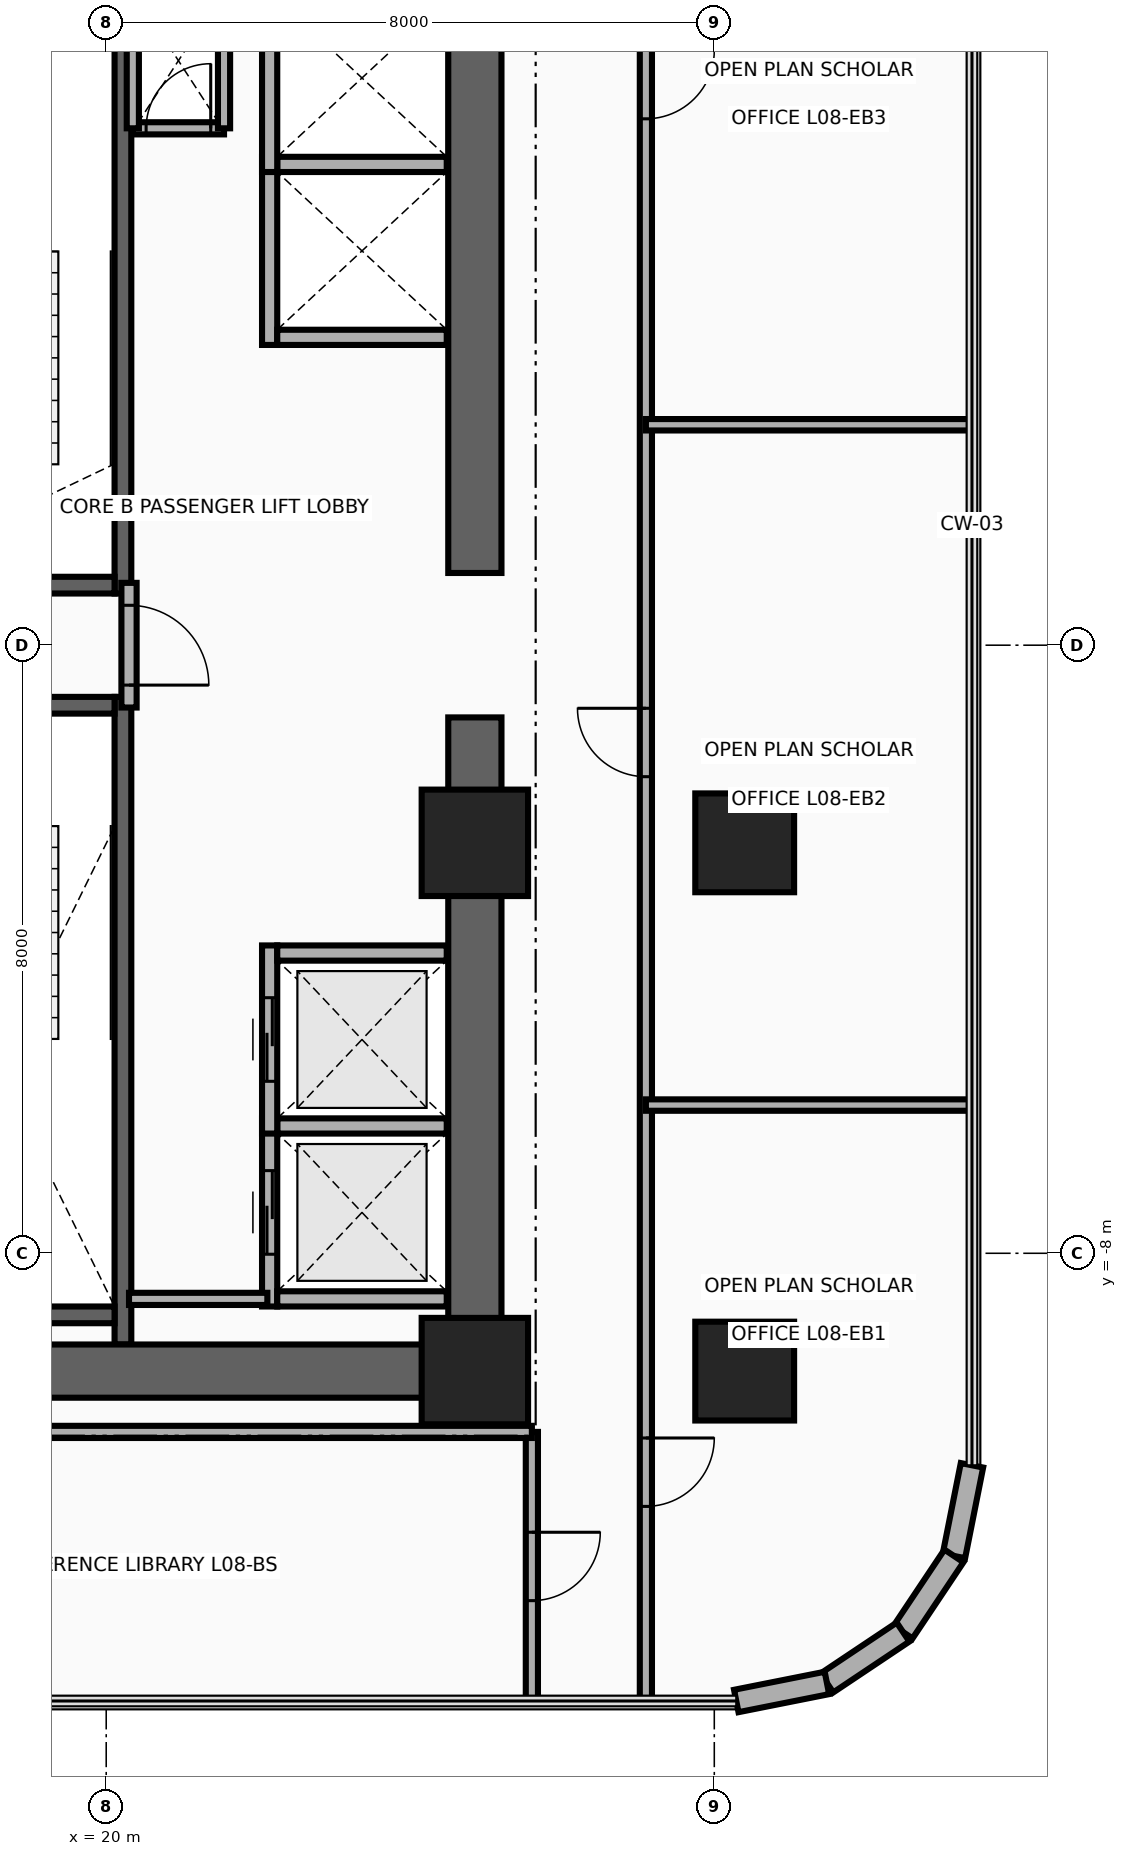
"""IFC4 building model, lengths in metres.
Left out: names, types, materials, properties, quantities, classifications, styles, units other than length and angle.
Written with IfcOpenShell. Run it as: python <this file> out.ifc"""

import sys

from ifc_helpers import new_model, si_unit, direction, frame, frame_2d, origin, origin_2d, place, context, subcontext, project, spatial, rectangle, circle, extrude, source, transform, mapped, element, fill, save


model = new_model("IFC4")
c1 = context("Model", 3, precision=1e-05, world=origin(), true_north=direction((0.0, 1.0)))
c2 = subcontext(c1, "Body", "Model", "MODEL_VIEW")
j1 = project(units=[si_unit("LENGTHUNIT", "METRE"), si_unit("PLANEANGLEUNIT", "RADIAN")], contexts=[c1])
p1 = place(None, origin())
s1 = spatial("IfcSite", under=j1, at=p1, CompositionType="ELEMENT")
p2 = place(p1, origin())
s2 = spatial("IfcBuilding", under=s1, at=p2, CompositionType="ELEMENT")
p3 = place(p2, frame((0.0, 0.0, 37.1)))
s3 = spatial("IfcBuildingStorey", under=s2, at=p3, CompositionType="ELEMENT", Elevation=37.1)
p4 = place(p3, frame((20.22, 0.68, 0.0), z_axis=(0.0, 0.0, 1.0), x_axis=(0.0, 1.0, 0.0)))
e1 = element("IfcWall", 1, at=p4, inside=s3, PredefinedType="SHEAR", context=c2, shape_type="SweptSolid", body=[
    extrude(rectangle(XDim=8.52, YDim=0.22, at=frame_2d((4.26, 0.0))), origin(), (0.0, 0.0, 1.0), 3.46),
])
p5 = place(p3, frame((17.0, 0.79, 0.0), z_axis=(0.0, 0.0, 1.0), x_axis=(1.0, 0.0, 0.0)))
e2 = element("IfcWall", 2, at=p5, inside=s3, PredefinedType="SHEAR", context=c2, shape_type="SweptSolid", body=[
    extrude(rectangle(XDim=3.11, YDim=0.22, at=frame_2d((1.555, 0.0))), origin(), (0.0, 0.0, 1.0), 3.46),
])
p6 = place(p5, frame((0.95, 0.0, 0.0)))
e3 = element("IfcOpeningElement", 3, at=p6, cuts=e2, PredefinedType="OPENING", context=c2, shape_type="SweptSolid", body=[
    extrude(rectangle(XDim=1.1, YDim=2.15, at=frame_2d((0.55, 1.075))), frame((0.0, 0.125, 0.0), z_axis=(0.0, -1.0, 0.0), x_axis=(1.0, 0.0, 0.0)), (0.0, 0.0, 1.0), 0.25),
])
p7 = place(p3, frame((20.22, -9.2, 0.0), z_axis=(0.0, 0.0, 1.0), x_axis=(0.0, 1.0, 0.0)))
e4 = element("IfcWall", 4, at=p7, inside=s3, PredefinedType="SHEAR", context=c2, shape_type="SweptSolid", body=[
    extrude(rectangle(XDim=8.52, YDim=0.22, at=frame_2d((4.26, 0.0))), origin(), (0.0, 0.0, 1.0), 3.46),
])
p8 = place(p3, frame((17.0, -8.81, 0.0), z_axis=(0.0, 0.0, 1.0), x_axis=(1.0, 0.0, 0.0)))
e5 = element("IfcWall", 5, at=p8, inside=s3, PredefinedType="SHEAR", context=c2, shape_type="SweptSolid", body=[
    extrude(rectangle(XDim=3.11, YDim=0.22, at=frame_2d((1.555, 0.0))), origin(), (0.0, 0.0, 1.0), 3.46),
])
p9 = place(p3, frame((17.0, -0.79, 0.0), z_axis=(0.0, 0.0, 1.0), x_axis=(1.0, 0.0, 0.0)))
e6 = element("IfcWall", 6, at=p9, inside=s3, PredefinedType="SHEAR", context=c2, shape_type="SweptSolid", body=[
    extrude(rectangle(XDim=3.11, YDim=0.22, at=frame_2d((1.555, 0.0))), origin(), (0.0, 0.0, 1.0), 3.46),
])
p10 = place(p9, frame((0.95, 0.0, 0.0)))
e7 = element("IfcOpeningElement", 7, at=p10, cuts=e6, PredefinedType="OPENING", context=c2, shape_type="SweptSolid", body=[
    extrude(rectangle(XDim=1.1, YDim=2.15, at=frame_2d((0.55, 1.075))), frame((0.0, 0.125, 0.0), z_axis=(0.0, -1.0, 0.0), x_axis=(1.0, 0.0, 0.0)), (0.0, 0.0, 1.0), 0.25),
])
for number, where, z_axis, x_axis in (
    (8, (24.85, -9.9, 0.0), (0.0, 0.0, 1.0), (0.0, 1.0, 0.0)),
    (9, (24.85, 0.95, 0.0), (0.0, 0.0, 1.0), (0.0, 1.0, 0.0)),
):
    element("IfcWall", number, at=place(p3, frame(where, z_axis=z_axis, x_axis=x_axis)), inside=s3, PredefinedType="SHEAR", context=c2, shape_type="SweptSolid", body=[
        extrude(rectangle(XDim=8.95, YDim=0.7, at=frame_2d((4.475, 0.0))), origin(), (0.0, 0.0, 1.0), 3.46),
    ])
p11 = place(p3, frame((15.85, -9.55, 0.0), z_axis=(0.0, 0.0, 1.0), x_axis=(1.0, 0.0, 0.0)))
e10 = element("IfcWall", 10, at=p11, inside=s3, PredefinedType="SHEAR", context=c2, shape_type="SweptSolid", body=[
    extrude(rectangle(XDim=9.0, YDim=0.7, at=frame_2d((4.5, 0.0))), origin(), (0.0, 0.0, 1.0), 3.46),
])
m1 = source(origin(), c2, "Body", "SweptSolid", [
    extrude(rectangle(XDim=1.4, YDim=1.4, at=origin_2d()), origin(), (0.0, 0.0, 1.0), 3.7),
])
p12 = place(p3, frame((24.85, -9.55, 0.0), z_axis=(0.0, 0.0, 1.0), x_axis=(1.0, 0.0, 0.0)))
e11 = element("IfcColumn", 11, at=p12, inside=s3, PredefinedType="COLUMN", context=c2, shape_type="MappedRepresentation", body=[
    mapped(m1, transform((0.0, 0.0, 0.0), x_axis=(1.0, 0.0, 0.0), y_axis=(0.0, 1.0, 0.0), z_axis=(0.0, 0.0, 1.0), scale=1.0)),
])
m2 = source(origin(), c2, "Body", "SweptSolid", [
    extrude(circle(Radius=0.65, at=origin_2d()), origin(), (0.0, 0.0, 1.0), 3.7),
])
p13 = place(p3, frame((28.4, -9.55, 0.0), z_axis=(0.0, 0.0, 1.0), x_axis=(1.0, 0.0, 0.0)))
e12 = element("IfcColumn", 12, at=p13, inside=s3, PredefinedType="COLUMN", context=c2, shape_type="MappedRepresentation", body=[
    mapped(m2, transform((0.0, 0.0, 0.0), x_axis=(1.0, 0.0, 0.0), y_axis=(0.0, 1.0, 0.0), z_axis=(0.0, 0.0, 1.0), scale=1.0)),
])
p14 = place(p3, frame((24.85, -2.6, 0.0), z_axis=(0.0, 0.0, 1.0), x_axis=(1.0, 0.0, 0.0)))
e13 = element("IfcColumn", 13, at=p14, inside=s3, PredefinedType="COLUMN", context=c2, shape_type="MappedRepresentation", body=[
    mapped(m1, transform((0.0, 0.0, 0.0), x_axis=(1.0, 0.0, 0.0), y_axis=(0.0, 1.0, 0.0), z_axis=(0.0, 0.0, 1.0), scale=1.0)),
])
p15 = place(p3, frame((28.4, -2.6, 0.0), z_axis=(0.0, 0.0, 1.0), x_axis=(1.0, 0.0, 0.0)))
e14 = element("IfcColumn", 14, at=p15, inside=s3, PredefinedType="COLUMN", context=c2, shape_type="MappedRepresentation", body=[
    mapped(m2, transform((0.0, 0.0, 0.0), x_axis=(1.0, 0.0, 0.0), y_axis=(0.0, 1.0, 0.0), z_axis=(0.0, 0.0, 1.0), scale=1.0)),
])
p16 = place(p3, frame((31.39, -10.789, 0.0), z_axis=(0.0, 0.0, 1.0), x_axis=(-0.194996050505, -0.980804027463, 0.0)))
e15 = element("IfcWall", 15, at=p16, inside=s3, PredefinedType="SOLIDWALL", context=c2, shape_type="SweptSolid", body=[
    extrude(rectangle(XDim=1.216, YDim=0.3, at=frame_2d((0.608, 0.0))), origin(), (0.0, 0.0, 1.0), 3.46),
])
for number, where, z_axis, x_axis in (
    (16, (31.153, -11.982, 0.0), (0.0, 0.0, 1.0), (-0.556, -0.831, 0.0)),
    (17, (30.483, -12.983, 0.0), (0.0, 0.0, 1.0), (-0.831, -0.556, 0.0)),
):
    element("IfcWall", number, at=place(p3, frame(where, z_axis=z_axis, x_axis=x_axis)), inside=s3, PredefinedType="SOLIDWALL", context=c2, shape_type="SweptSolid", body=[
        extrude(rectangle(XDim=1.205, YDim=0.3, at=frame_2d((0.603, 0.0))), origin(), (0.0, 0.0, 1.0), 3.46),
    ])
p17 = place(p3, frame((29.482, -13.653, 0.0), z_axis=(0.0, 0.0, 1.0), x_axis=(-0.980804027463, -0.194996050505, 0.0)))
e18 = element("IfcWall", 18, at=p17, inside=s3, PredefinedType="SOLIDWALL", context=c2, shape_type="SweptSolid", body=[
    extrude(rectangle(XDim=1.216, YDim=0.3, at=frame_2d((0.608, 0.0))), origin(), (0.0, 0.0, 1.0), 3.46),
])
p18 = place(p3, frame((22.15, -8.7, 0.0), z_axis=(0.0, 0.0, 1.0), x_axis=(0.0, 1.0, 0.0)))
e19 = element("IfcWall", 19, at=p18, inside=s3, PredefinedType="MOVABLE", context=c2, shape_type="SweptSolid", body=[
    extrude(rectangle(XDim=2.475, YDim=0.2, at=frame_2d((1.237, 0.0))), origin(), (0.0, 0.0, 1.0), 3.46),
])
p19 = place(p18, frame((0.688, 0.0, 0.0)))
e20 = element("IfcOpeningElement", 20, at=p19, cuts=e19, PredefinedType="OPENING", context=c2, shape_type="SweptSolid", body=[
    extrude(rectangle(XDim=1.1, YDim=2.1, at=frame_2d((0.55, 1.05))), frame((0.0, 0.115, 0.0), z_axis=(0.0, -1.0, 0.0), x_axis=(1.0, 0.0, 0.0)), (0.0, 0.0, 1.0), 0.23),
])
for number, where, z_axis, x_axis in (
    (21, (22.25, -8.6, 0.0), (0.0, 0.0, 1.0), (1.0, 0.0, 0.0)),
    (22, (22.25, -6.325, 0.0), (0.0, 0.0, 1.0), (1.0, 0.0, 0.0)),
):
    element("IfcWall", number, at=place(p3, frame(where, z_axis=z_axis, x_axis=x_axis)), inside=s3, PredefinedType="MOVABLE", context=c2, shape_type="SweptSolid", body=[
        extrude(rectangle(XDim=2.23, YDim=0.2, at=frame_2d((1.115, 0.0))), origin(), (0.0, 0.0, 1.0), 3.46),
    ])
p20 = place(p3, frame((22.15, -6.425, 0.0), z_axis=(0.0, 0.0, 1.0), x_axis=(0.0, 1.0, 0.0)))
e23 = element("IfcWall", 23, at=p20, inside=s3, PredefinedType="MOVABLE", context=c2, shape_type="SweptSolid", body=[
    extrude(rectangle(XDim=2.475, YDim=0.2, at=frame_2d((1.238, 0.0))), origin(), (0.0, 0.0, 1.0), 3.46),
])
p21 = place(p20, frame((0.688, 0.0, 0.0)))
e24 = element("IfcOpeningElement", 24, at=p21, cuts=e23, PredefinedType="OPENING", context=c2, shape_type="SweptSolid", body=[
    extrude(rectangle(XDim=1.1, YDim=2.1, at=frame_2d((0.55, 1.05))), frame((0.0, 0.115, 0.0), z_axis=(0.0, -1.0, 0.0), x_axis=(1.0, 0.0, 0.0)), (0.0, 0.0, 1.0), 0.23),
])
p22 = place(p3, frame((22.25, -4.05, 0.0), z_axis=(0.0, 0.0, 1.0), x_axis=(1.0, 0.0, 0.0)))
e25 = element("IfcWall", 25, at=p22, inside=s3, PredefinedType="MOVABLE", context=c2, shape_type="SweptSolid", body=[
    extrude(rectangle(XDim=2.23, YDim=0.2, at=frame_2d((1.115, 0.0))), origin(), (0.0, 0.0, 1.0), 3.46),
])
p23 = place(p3, frame((22.15, 3.95, 0.0), z_axis=(0.0, 0.0, 1.0), x_axis=(0.0, 1.0, 0.0)))
e26 = element("IfcWall", 26, at=p23, inside=s3, PredefinedType="MOVABLE", context=c2, shape_type="SweptSolid", body=[
    extrude(rectangle(XDim=2.475, YDim=0.2, at=frame_2d((1.238, 0.0))), origin(), (0.0, 0.0, 1.0), 3.46),
])
for number, where, z_axis, x_axis in (
    (27, (22.25, 4.05, 0.0), (0.0, 0.0, 1.0), (1.0, 0.0, 0.0)),
    (28, (22.25, 6.325, 0.0), (0.0, 0.0, 1.0), (1.0, 0.0, 0.0)),
):
    element("IfcWall", number, at=place(p3, frame(where, z_axis=z_axis, x_axis=x_axis)), inside=s3, PredefinedType="MOVABLE", context=c2, shape_type="SweptSolid", body=[
        extrude(rectangle(XDim=2.23, YDim=0.2, at=frame_2d((1.115, 0.0))), origin(), (0.0, 0.0, 1.0), 2.245),
    ])
p24 = place(p3, frame((22.15, 6.225, 0.0), z_axis=(0.0, 0.0, 1.0), x_axis=(0.0, 1.0, 0.0)))
e29 = element("IfcWall", 29, at=p24, inside=s3, PredefinedType="MOVABLE", context=c2, shape_type="SweptSolid", body=[
    extrude(rectangle(XDim=2.475, YDim=0.2, at=frame_2d((1.237, 0.0))), origin(), (0.0, 0.0, 1.0), 3.46),
])
p25 = place(p3, frame((20.3, -0.82, 0.0), z_axis=(0.0, 0.0, 1.0), x_axis=(0.0, 1.0, 0.0)))
e30 = element("IfcWall", 30, at=p25, inside=s3, PredefinedType="PARTITIONING", context=c2, shape_type="SweptSolid", body=[
    extrude(rectangle(XDim=1.64, YDim=0.2, at=frame_2d((0.82, 0.0))), origin(), (0.0, 0.0, 1.0), 3.46),
])
p26 = place(p25, frame((0.295, 0.0, 0.0)))
e31 = element("IfcOpeningElement", 31, at=p26, cuts=e30, PredefinedType="OPENING", context=c2, shape_type="SweptSolid", body=[
    extrude(rectangle(XDim=1.05, YDim=2.15, at=frame_2d((0.525, 1.075))), frame((0.0, 0.115, 0.0), z_axis=(0.0, -1.0, 0.0), x_axis=(1.0, 0.0, 0.0)), (0.0, 0.0, 1.0), 0.23),
])
p27 = place(p3, frame((20.35, 6.8, 0.0), z_axis=(0.0, 0.0, 1.0), x_axis=(1.0, 0.0, 0.0)))
e32 = element("IfcWall", 32, at=p27, inside=s3, PredefinedType="PARTITIONING", context=c2, shape_type="SweptSolid", body=[
    extrude(rectangle(XDim=1.2, YDim=0.16, at=frame_2d((0.6, 0.0))), origin(), (0.0, 0.0, 1.0), 3.46),
])
p28 = place(p27, frame((0.175, 0.0, 0.0)))
e33 = element("IfcOpeningElement", 33, at=p28, cuts=e32, PredefinedType="OPENING", context=c2, shape_type="SweptSolid", body=[
    extrude(rectangle(XDim=0.85, YDim=2.05, at=frame_2d((0.425, 1.025))), frame((0.0, 0.095, 0.0), z_axis=(0.0, -1.0, 0.0), x_axis=(1.0, 0.0, 0.0)), (0.0, 0.0, 1.0), 0.19),
])
for number, where, z_axis, x_axis in (
    (34, (21.55, 6.8, 0.0), (0.0, 0.0, 1.0), (0.0, 1.0, 0.0)),
    (35, (20.35, 6.8, 0.0), (0.0, 0.0, 1.0), (0.0, 1.0, 0.0)),
):
    element("IfcWall", number, at=place(p3, frame(where, z_axis=z_axis, x_axis=x_axis)), inside=s3, PredefinedType="PARTITIONING", context=c2, shape_type="SweptSolid", body=[
        extrude(rectangle(XDim=1.8, YDim=0.16, at=frame_2d((0.9, 0.0))), origin(), (0.0, 0.0, 1.0), 3.46),
    ])
p29 = place(p3, frame((20.3, -8.6, 0.0), z_axis=(0.0, 0.0, 1.0), x_axis=(1.0, 0.0, 0.0)))
e36 = element("IfcWall", 36, at=p29, inside=s3, PredefinedType="PARTITIONING", context=c2, shape_type="SweptSolid", body=[
    extrude(rectangle(XDim=1.82, YDim=0.16, at=frame_2d((0.91, 0.0))), origin(), (0.0, 0.0, 1.0), 3.46),
])
p30 = place(p3, frame((25.6, -13.89, 0.0), z_axis=(0.0, 0.0, 1.0), x_axis=(0.0, 1.0, 0.0)))
e37 = element("IfcWall", 37, at=p30, inside=s3, PredefinedType="PARTITIONING", context=c2, shape_type="SweptSolid", body=[
    extrude(rectangle(XDim=3.54, YDim=0.16, at=frame_2d((1.77, 0.0))), origin(), (0.0, 0.0, 1.0), 3.46),
])
p31 = place(p30, frame((1.32, 0.0, 0.0)))
e38 = element("IfcOpeningElement", 38, at=p31, cuts=e37, PredefinedType="OPENING", context=c2, shape_type="SweptSolid", body=[
    extrude(rectangle(XDim=0.9, YDim=2.1, at=frame_2d((0.45, 1.05))), frame((0.0, 0.095, 0.0), z_axis=(0.0, -1.0, 0.0), x_axis=(1.0, 0.0, 0.0)), (0.0, 0.0, 1.0), 0.19),
])
p32 = place(p3, frame((13.41, -10.35, 0.0), z_axis=(0.0, 0.0, 1.0), x_axis=(1.0, 0.0, 0.0)))
e39 = element("IfcWall", 39, at=p32, inside=s3, PredefinedType="PARTITIONING", context=c2, shape_type="SweptSolid", body=[
    extrude(rectangle(XDim=12.19, YDim=0.16, at=frame_2d((6.095, 0.0))), origin(), (0.0, 0.0, 1.0), 3.46),
])
p33 = place(p3, frame((27.1, -13.89, 0.0), z_axis=(0.0, 0.0, 1.0), x_axis=(0.0, 1.0, 0.0)))
e40 = element("IfcWall", 40, at=p33, inside=s3, PredefinedType="PARTITIONING", context=c2, shape_type="SweptSolid", body=[
    extrude(rectangle(XDim=25.74, YDim=0.16, at=frame_2d((12.87, 0.0))), origin(), (0.0, 0.0, 1.0), 2.583),
])
p34 = place(p33, frame((2.56, 0.0, 0.0)))
e41 = element("IfcOpeningElement", 41, at=p34, cuts=e40, PredefinedType="OPENING", context=c2, shape_type="SweptSolid", body=[
    extrude(rectangle(XDim=0.9, YDim=2.1, at=frame_2d((0.45, 1.05))), frame((0.0, 0.095, 0.0), z_axis=(0.0, -1.0, 0.0), x_axis=(1.0, 0.0, 0.0)), (0.0, 0.0, 1.0), 0.19),
])
p35 = place(p33, frame((12.16, 0.0, 0.0)))
e42 = element("IfcOpeningElement", 42, at=p35, cuts=e40, PredefinedType="OPENING", context=c2, shape_type="SweptSolid", body=[
    extrude(rectangle(XDim=0.9, YDim=2.1, at=frame_2d((0.45, 1.05))), frame((0.0, 0.095, 0.0), z_axis=(0.0, -1.0, 0.0), x_axis=(1.0, 0.0, 0.0)), (0.0, 0.0, 1.0), 0.19),
])
p36 = place(p33, frame((20.815, 0.0, 0.0)))
e43 = element("IfcOpeningElement", 43, at=p36, cuts=e40, PredefinedType="OPENING", context=c2, shape_type="SweptSolid", body=[
    extrude(rectangle(XDim=0.9, YDim=2.1, at=frame_2d((0.45, 1.05))), frame((0.0, 0.095, 0.0), z_axis=(0.0, -1.0, 0.0), x_axis=(1.0, 0.0, 0.0)), (0.0, 0.0, 1.0), 0.19),
])
for number, where, z_axis, x_axis in (
    (44, (27.1, -6.05, 0.0), (0.0, 0.0, 1.0), (1.0, 0.0, 0.0)),
    (45, (27.1, 2.9, 0.0), (0.0, 0.0, 1.0), (1.0, 0.0, 0.0)),
):
    element("IfcWall", number, at=place(p3, frame(where, z_axis=z_axis, x_axis=x_axis)), inside=s3, PredefinedType="PARTITIONING", context=c2, shape_type="SweptSolid", body=[
        extrude(rectangle(XDim=4.29, YDim=0.15, at=frame_2d((2.145, 0.0))), origin(), (0.0, 0.0, 1.0), 2.896),
    ])
p37 = place(p19, origin())
e46 = element("IfcDoor", 46, at=p37, inside=s3, OperationType="DOUBLE_DOOR_SLIDING", PredefinedType="DOOR", context=c2, shape_type="SweptSolid", body=[
    extrude(rectangle(XDim=1.1, YDim=2.1, at=frame_2d((0.55, 1.05))), frame((0.0, 0.025, 0.0), z_axis=(0.0, -1.0, 0.0), x_axis=(1.0, 0.0, 0.0)), (0.0, 0.0, 1.0), 0.05),
])
fill(e20, e46)
p38 = place(p21, origin())
e47 = element("IfcDoor", 47, at=p38, inside=s3, OperationType="DOUBLE_DOOR_SLIDING", PredefinedType="DOOR", context=c2, shape_type="SweptSolid", body=[
    extrude(rectangle(XDim=1.1, YDim=2.1, at=frame_2d((0.55, 1.05))), frame((0.0, 0.025, 0.0), z_axis=(0.0, -1.0, 0.0), x_axis=(1.0, 0.0, 0.0)), (0.0, 0.0, 1.0), 0.05),
])
fill(e24, e47)
p39 = place(p26, frame((1.05, 0.0, 0.0), z_axis=(0.0, 0.0, 1.0), x_axis=(-1.0, 0.0, 0.0)))
e48 = element("IfcDoor", 48, at=p39, inside=s3, OperationType="SINGLE_SWING_LEFT", PredefinedType="DOOR", context=c2, shape_type="SweptSolid", body=[
    extrude(rectangle(XDim=1.05, YDim=2.15, at=frame_2d((0.525, 1.075))), frame((0.0, 0.025, 0.0), z_axis=(0.0, -1.0, 0.0), x_axis=(1.0, 0.0, 0.0)), (0.0, 0.0, 1.0), 0.05),
])
fill(e31, e48)
p40 = place(p28, origin())
e49 = element("IfcDoor", 49, at=p40, inside=s3, OperationType="SINGLE_SWING_RIGHT", PredefinedType="DOOR", context=c2, shape_type="SweptSolid", body=[
    extrude(rectangle(XDim=0.85, YDim=2.05, at=frame_2d((0.425, 1.025))), frame((0.0, 0.025, 0.0), z_axis=(0.0, -1.0, 0.0), x_axis=(1.0, 0.0, 0.0)), (0.0, 0.0, 1.0), 0.05),
])
fill(e33, e49)
p41 = place(p31, frame((0.9, 0.0, 0.0), z_axis=(0.0, 0.0, 1.0), x_axis=(-1.0, 0.0, 0.0)))
e50 = element("IfcDoor", 50, at=p41, inside=s3, OperationType="SINGLE_SWING_LEFT", PredefinedType="DOOR", context=c2, shape_type="SweptSolid", body=[
    extrude(rectangle(XDim=0.9, YDim=2.1, at=frame_2d((0.45, 1.05))), frame((0.0, 0.025, 0.0), z_axis=(0.0, -1.0, 0.0), x_axis=(1.0, 0.0, 0.0)), (0.0, 0.0, 1.0), 0.05),
])
fill(e38, e50)
p42 = place(p34, frame((0.9, 0.0, 0.0), z_axis=(0.0, 0.0, 1.0), x_axis=(-1.0, 0.0, 0.0)))
e51 = element("IfcDoor", 51, at=p42, inside=s3, OperationType="SINGLE_SWING_LEFT", PredefinedType="DOOR", context=c2, shape_type="SweptSolid", body=[
    extrude(rectangle(XDim=0.9, YDim=2.1, at=frame_2d((0.45, 1.05))), frame((0.0, 0.025, 0.0), z_axis=(0.0, -1.0, 0.0), x_axis=(1.0, 0.0, 0.0)), (0.0, 0.0, 1.0), 0.05),
])
fill(e41, e51)
p43 = place(p35, origin())
e52 = element("IfcDoor", 52, at=p43, inside=s3, OperationType="SINGLE_SWING_RIGHT", PredefinedType="DOOR", context=c2, shape_type="SweptSolid", body=[
    extrude(rectangle(XDim=0.9, YDim=2.1, at=frame_2d((0.45, 1.05))), frame((0.0, 0.025, 0.0), z_axis=(0.0, -1.0, 0.0), x_axis=(1.0, 0.0, 0.0)), (0.0, 0.0, 1.0), 0.05),
])
fill(e42, e52)
p44 = place(p36, frame((0.9, 0.0, 0.0), z_axis=(0.0, 0.0, 1.0), x_axis=(-1.0, 0.0, 0.0)))
e53 = element("IfcDoor", 53, at=p44, inside=s3, OperationType="SINGLE_SWING_LEFT", PredefinedType="DOOR", context=c2, shape_type="SweptSolid", body=[
    extrude(rectangle(XDim=0.9, YDim=2.1, at=frame_2d((0.45, 1.05))), frame((0.0, 0.025, 0.0), z_axis=(0.0, -1.0, 0.0), x_axis=(1.0, 0.0, 0.0)), (0.0, 0.0, 1.0), 0.05),
])
fill(e43, e53)
save(model, sys.argv[1])
